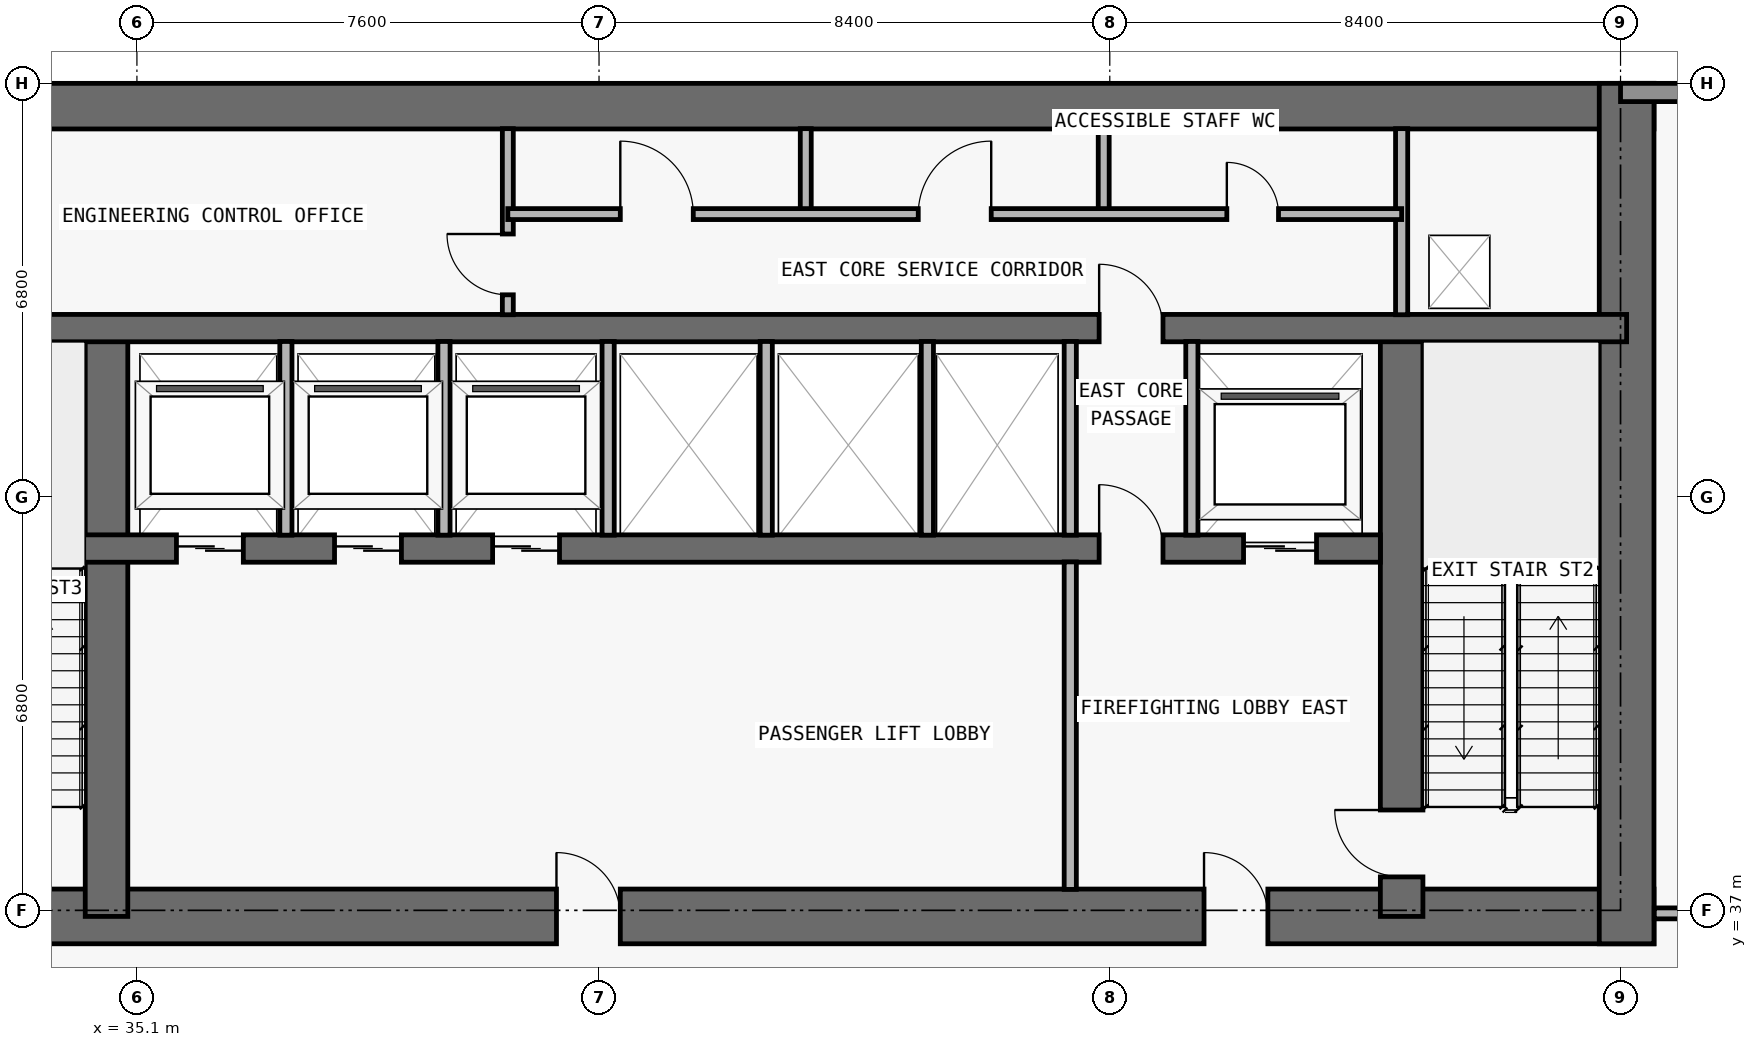
"""IFC4 building model, lengths in metres.
Left out: names, types, materials, properties, quantities, classifications, styles, units other than length and angle.
Written with IfcOpenShell. Run it as: python <this file> out.ifc"""

import sys

from ifc_helpers import new_model, si_unit, direction, frame, frame_2d, origin, place, context, subcontext, project, spatial, rectangle, extrude, element, fill, save


model = new_model("IFC4")
c1 = context("Model", 3, precision=1e-05, world=origin(), true_north=direction((0.0, 1.0)))
c2 = subcontext(c1, "Body", "Model", "MODEL_VIEW")
j1 = project(units=[si_unit("LENGTHUNIT", "METRE"), si_unit("PLANEANGLEUNIT", "RADIAN")], contexts=[c1])
p1 = place(None, origin())
s1 = spatial("IfcSite", under=j1, at=p1, CompositionType="ELEMENT")
p2 = place(p1, origin())
s2 = spatial("IfcBuilding", under=s1, at=p2, CompositionType="ELEMENT")
p3 = place(p2, frame((0.0, 0.0, 79.5)))
s3 = spatial("IfcBuildingStorey", under=s2, at=p3, CompositionType="ELEMENT", Elevation=79.5)
p4 = place(p3, frame((17.75, 36.9, 0.0), z_axis=(0.0, 0.0, 1.0), x_axis=(1.0, 0.0, 0.0)))
e1 = element("IfcWall", 1, at=p4, inside=s3, PredefinedType="SHEAR", context=c2, shape_type="SweptSolid", body=[
    extrude(rectangle(XDim=42.3, YDim=0.9, at=frame_2d((21.15, 0.0))), origin(), (0.0, 0.0, 1.0), 4.85),
])
p5 = place(p4, frame((14.55, 0.0, 0.0)))
e2 = element("IfcOpeningElement", 2, at=p5, cuts=e1, PredefinedType="OPENING", context=c2, shape_type="SweptSolid", body=[
    extrude(rectangle(XDim=1.1, YDim=2.15, at=frame_2d((0.55, 1.075))), frame((0.0, 0.46, 0.0), z_axis=(0.0, -1.0, 0.0), x_axis=(1.0, 0.0, 0.0)), (0.0, 0.0, 1.0), 0.92),
])
p6 = place(p4, frame((6.4, 0.0, 0.0)))
e3 = element("IfcOpeningElement", 3, at=p6, cuts=e1, PredefinedType="OPENING", context=c2, shape_type="SweptSolid", body=[
    extrude(rectangle(XDim=1.05, YDim=2.15, at=frame_2d((0.525, 1.075))), frame((0.0, 0.46, 0.0), z_axis=(0.0, -1.0, 0.0), x_axis=(1.0, 0.0, 0.0)), (0.0, 0.0, 1.0), 0.92),
])
p7 = place(p4, frame((34.9, 0.0, 0.0)))
e4 = element("IfcOpeningElement", 4, at=p7, cuts=e1, PredefinedType="OPENING", context=c2, shape_type="SweptSolid", body=[
    extrude(rectangle(XDim=1.05, YDim=2.15, at=frame_2d((0.525, 1.075))), frame((0.0, 0.46, 0.0), z_axis=(0.0, -1.0, 0.0), x_axis=(1.0, 0.0, 0.0)), (0.0, 0.0, 1.0), 0.92),
])
p8 = place(p4, frame((11.012, 0.0, 0.0)))
e5 = element("IfcOpeningElement", 5, at=p8, cuts=e1, PredefinedType="OPENING", context=c2, shape_type="SweptSolid", body=[
    extrude(rectangle(XDim=1.05, YDim=2.15, at=frame_2d((0.525, 1.075))), frame((0.0, 0.46, 0.0), z_axis=(0.0, -1.0, 0.0), x_axis=(1.0, 0.0, 0.0)), (0.0, 0.0, 1.0), 0.92),
])
p9 = place(p4, frame((24.25, 0.0, 0.0)))
e6 = element("IfcOpeningElement", 6, at=p9, cuts=e1, PredefinedType="OPENING", context=c2, shape_type="SweptSolid", body=[
    extrude(rectangle(XDim=1.05, YDim=2.15, at=frame_2d((0.525, 1.075))), frame((0.0, 0.46, 0.0), z_axis=(0.0, -1.0, 0.0), x_axis=(1.0, 0.0, 0.0)), (0.0, 0.0, 1.0), 0.92),
])
p10 = place(p3, frame((17.75, 50.225, 0.0), z_axis=(0.0, 0.0, 1.0), x_axis=(1.0, 0.0, 0.0)))
e7 = element("IfcWall", 7, at=p10, inside=s3, PredefinedType="SHEAR", context=c2, shape_type="SweptSolid", body=[
    extrude(rectangle(XDim=42.3, YDim=0.75, at=frame_2d((21.15, 0.0))), origin(), (0.0, 0.0, 1.0), 4.85),
])
p11 = place(p3, frame((59.6, 36.45, 0.0), z_axis=(0.0, 0.0, 1.0), x_axis=(0.0, 1.0, 0.0)))
e8 = element("IfcWall", 8, at=p11, inside=s3, PredefinedType="SHEAR", context=c2, shape_type="SweptSolid", body=[
    extrude(rectangle(XDim=14.15, YDim=0.9, at=frame_2d((7.075, 0.0))), origin(), (0.0, 0.0, 1.0), 4.85),
])
p12 = place(p3, frame((55.9, 36.9, 0.0), z_axis=(0.0, 0.0, 1.0), x_axis=(0.0, 1.0, 0.0)))
e9 = element("IfcWall", 9, at=p12, inside=s3, PredefinedType="SHEAR", context=c2, shape_type="SweptSolid", body=[
    extrude(rectangle(XDim=9.675, YDim=0.7, at=frame_2d((4.837, 0.0))), origin(), (0.0, 0.0, 1.0), 4.85),
])
p13 = place(p12, frame((0.65, 0.0, 0.0)))
e10 = element("IfcOpeningElement", 10, at=p13, cuts=e9, PredefinedType="OPENING", context=c2, shape_type="SweptSolid", body=[
    extrude(rectangle(XDim=1.1, YDim=2.15, at=frame_2d((0.55, 1.075))), frame((0.0, 0.36, 0.0), z_axis=(0.0, -1.0, 0.0), x_axis=(1.0, 0.0, 0.0)), (0.0, 0.0, 1.0), 0.72),
])
p14 = place(p3, frame((34.6, 36.9, 0.0), z_axis=(0.0, 0.0, 1.0), x_axis=(0.0, 1.0, 0.0)))
e11 = element("IfcWall", 11, at=p14, inside=s3, PredefinedType="SHEAR", context=c2, shape_type="SweptSolid", body=[
    extrude(rectangle(XDim=9.675, YDim=0.7, at=frame_2d((4.837, 0.0))), origin(), (0.0, 0.0, 1.0), 4.85),
])
p15 = place(p3, frame((22.25, 42.95, 0.0), z_axis=(0.0, 0.0, 1.0), x_axis=(1.0, 0.0, 0.0)))
e12 = element("IfcWall", 12, at=p15, inside=s3, PredefinedType="SHEAR", context=c2, shape_type="SweptSolid", body=[
    extrude(rectangle(XDim=33.3, YDim=0.45, at=frame_2d((16.65, 0.0))), origin(), (0.0, 0.0, 1.0), 4.85),
])
p16 = place(p15, frame((1.05, 0.0, 0.0)))
e13 = element("IfcOpeningElement", 13, at=p16, cuts=e12, PredefinedType="OPENING", context=c2, shape_type="SweptSolid", body=[
    extrude(rectangle(XDim=1.2, YDim=2.2, at=frame_2d((0.6, 1.1))), frame((0.0, 0.235, 0.0), z_axis=(0.0, -1.0, 0.0), x_axis=(1.0, 0.0, 0.0)), (0.0, 0.0, 1.0), 0.47),
])
p17 = place(p15, frame((31.05, 0.0, 0.0)))
e14 = element("IfcOpeningElement", 14, at=p17, cuts=e12, PredefinedType="OPENING", context=c2, shape_type="SweptSolid", body=[
    extrude(rectangle(XDim=1.2, YDim=2.2, at=frame_2d((0.6, 1.1))), frame((0.0, 0.235, 0.0), z_axis=(0.0, -1.0, 0.0), x_axis=(1.0, 0.0, 0.0)), (0.0, 0.0, 1.0), 0.47),
])
p18 = place(p15, frame((13.5, 0.0, 0.0)))
e15 = element("IfcOpeningElement", 15, at=p18, cuts=e12, PredefinedType="OPENING", context=c2, shape_type="SweptSolid", body=[
    extrude(rectangle(XDim=1.1, YDim=2.2, at=frame_2d((0.55, 1.1))), frame((0.0, 0.235, 0.0), z_axis=(0.0, -1.0, 0.0), x_axis=(1.0, 0.0, 0.0)), (0.0, 0.0, 1.0), 0.47),
])
p19 = place(p15, frame((16.1, 0.0, 0.0)))
e16 = element("IfcOpeningElement", 16, at=p19, cuts=e12, PredefinedType="OPENING", context=c2, shape_type="SweptSolid", body=[
    extrude(rectangle(XDim=1.1, YDim=2.2, at=frame_2d((0.55, 1.1))), frame((0.0, 0.235, 0.0), z_axis=(0.0, -1.0, 0.0), x_axis=(1.0, 0.0, 0.0)), (0.0, 0.0, 1.0), 0.47),
])
p20 = place(p15, frame((18.7, 0.0, 0.0)))
e17 = element("IfcOpeningElement", 17, at=p20, cuts=e12, PredefinedType="OPENING", context=c2, shape_type="SweptSolid", body=[
    extrude(rectangle(XDim=1.1, YDim=2.2, at=frame_2d((0.55, 1.1))), frame((0.0, 0.235, 0.0), z_axis=(0.0, -1.0, 0.0), x_axis=(1.0, 0.0, 0.0)), (0.0, 0.0, 1.0), 0.47),
])
p21 = place(p15, frame((3.625, 0.0, 0.0)))
e18 = element("IfcOpeningElement", 18, at=p21, cuts=e12, PredefinedType="OPENING", context=c2, shape_type="SweptSolid", body=[
    extrude(rectangle(XDim=1.05, YDim=2.15, at=frame_2d((0.525, 1.075))), frame((0.0, 0.235, 0.0), z_axis=(0.0, -1.0, 0.0), x_axis=(1.0, 0.0, 0.0)), (0.0, 0.0, 1.0), 0.47),
])
p22 = place(p15, frame((28.675, 0.0, 0.0)))
e19 = element("IfcOpeningElement", 19, at=p22, cuts=e12, PredefinedType="OPENING", context=c2, shape_type="SweptSolid", body=[
    extrude(rectangle(XDim=1.05, YDim=2.15, at=frame_2d((0.525, 1.075))), frame((0.0, 0.235, 0.0), z_axis=(0.0, -1.0, 0.0), x_axis=(1.0, 0.0, 0.0)), (0.0, 0.0, 1.0), 0.47),
])
p23 = place(p3, frame((18.2, 46.575, 0.0), z_axis=(0.0, 0.0, 1.0), x_axis=(1.0, 0.0, 0.0)))
e20 = element("IfcWall", 20, at=p23, inside=s3, PredefinedType="SHEAR", context=c2, shape_type="SweptSolid", body=[
    extrude(rectangle(XDim=41.4, YDim=0.45, at=frame_2d((20.7, 0.0))), origin(), (0.0, 0.0, 1.0), 4.85),
])
p24 = place(p23, frame((7.7, 0.0, 0.0)))
e21 = element("IfcOpeningElement", 21, at=p24, cuts=e20, PredefinedType="OPENING", context=c2, shape_type="SweptSolid", body=[
    extrude(rectangle(XDim=1.0, YDim=2.2, at=frame_2d((0.5, 1.1))), frame((0.0, 0.235, 0.0), z_axis=(0.0, -1.0, 0.0), x_axis=(1.0, 0.0, 0.0)), (0.0, 0.0, 1.0), 0.47),
])
p25 = place(p23, frame((32.725, 0.0, 0.0)))
e22 = element("IfcOpeningElement", 22, at=p25, cuts=e20, PredefinedType="OPENING", context=c2, shape_type="SweptSolid", body=[
    extrude(rectangle(XDim=1.05, YDim=2.15, at=frame_2d((0.525, 1.075))), frame((0.0, 0.235, 0.0), z_axis=(0.0, -1.0, 0.0), x_axis=(1.0, 0.0, 0.0)), (0.0, 0.0, 1.0), 0.47),
])
p26 = place(p3, frame((59.5, 50.45, 0.0), z_axis=(0.0, 0.0, 1.0), x_axis=(1.0, 0.0, 0.0)))
e23 = element("IfcWall", 23, at=p26, inside=s3, PredefinedType="STANDARD", context=c2, shape_type="SweptSolid", body=[
    extrude(rectangle(XDim=13.2, YDim=0.3, at=frame_2d((6.6, 0.0))), origin(), (0.0, 0.0, 1.0), 4.85),
])
p27 = place(p26, frame((5.5, 0.0, 0.85)))
e24 = element("IfcOpeningElement", 24, at=p27, cuts=e23, PredefinedType="OPENING", context=c2, shape_type="SweptSolid", body=[
    extrude(rectangle(XDim=2.2, YDim=1.55, at=frame_2d((1.1, 0.775))), frame((0.0, 0.16, 0.0), z_axis=(0.0, -1.0, 0.0), x_axis=(1.0, 0.0, 0.0)), (0.0, 0.0, 1.0), 0.32),
])
for number, where, z_axis, x_axis in (
    (25, (37.55, 43.17, 0.0), (0.0, 0.0, 1.0), (0.0, 1.0, 0.0)),
    (26, (40.15, 43.17, 0.0), (0.0, 0.0, 1.0), (0.0, 1.0, 0.0)),
):
    element("IfcWall", number, at=place(p3, frame(where, z_axis=z_axis, x_axis=x_axis)), inside=s3, PredefinedType="PARTITIONING", context=c2, shape_type="SweptSolid", body=[
        extrude(rectangle(XDim=3.185, YDim=0.2, at=frame_2d((1.593, 0.0))), origin(), (0.0, 0.0, 1.0), 4.85),
    ])
p28 = place(p3, frame((41.2, 46.795, 0.0), z_axis=(0.0, 0.0, 1.0), x_axis=(0.0, 1.0, 0.0)))
e27 = element("IfcWall", 27, at=p28, inside=s3, PredefinedType="PARTITIONING", context=c2, shape_type="SweptSolid", body=[
    extrude(rectangle(XDim=3.06, YDim=0.18, at=frame_2d((1.53, 0.0))), origin(), (0.0, 0.0, 1.0), 4.85),
])
p29 = place(p28, frame((0.327, 0.0, 0.0)))
e28 = element("IfcOpeningElement", 28, at=p29, cuts=e27, PredefinedType="OPENING", context=c2, shape_type="SweptSolid", body=[
    extrude(rectangle(XDim=1.0, YDim=2.2, at=frame_2d((0.5, 1.1))), frame((0.0, 0.1, 0.0), z_axis=(0.0, -1.0, 0.0), x_axis=(1.0, 0.0, 0.0)), (0.0, 0.0, 1.0), 0.2),
])
for number, where, z_axis, x_axis in (
    (29, (42.85, 43.17, 0.0), (0.0, 0.0, 1.0), (0.0, 1.0, 0.0)),
    (30, (45.45, 43.17, 0.0), (0.0, 0.0, 1.0), (0.0, 1.0, 0.0)),
):
    element("IfcWall", number, at=place(p3, frame(where, z_axis=z_axis, x_axis=x_axis)), inside=s3, PredefinedType="PARTITIONING", context=c2, shape_type="SweptSolid", body=[
        extrude(rectangle(XDim=3.185, YDim=0.2, at=frame_2d((1.593, 0.0))), origin(), (0.0, 0.0, 1.0), 4.85),
    ])
p30 = place(p3, frame((46.1, 48.45, 0.0), z_axis=(0.0, 0.0, 1.0), x_axis=(0.0, 1.0, 0.0)))
e31 = element("IfcWall", 31, at=p30, inside=s3, PredefinedType="PARTITIONING", context=c2, shape_type="SweptSolid", body=[
    extrude(rectangle(XDim=1.405, YDim=0.18, at=frame_2d((0.703, 0.0))), origin(), (0.0, 0.0, 1.0), 4.85),
])
p31 = place(p3, frame((48.1, 43.17, 0.0), z_axis=(0.0, 0.0, 1.0), x_axis=(0.0, 1.0, 0.0)))
e32 = element("IfcWall", 32, at=p31, inside=s3, PredefinedType="PARTITIONING", context=c2, shape_type="SweptSolid", body=[
    extrude(rectangle(XDim=3.185, YDim=0.2, at=frame_2d((1.593, 0.0))), origin(), (0.0, 0.0, 1.0), 4.85),
])
p32 = place(p3, frame((50.45, 37.345, 0.0), z_axis=(0.0, 0.0, 1.0), x_axis=(0.0, 1.0, 0.0)))
e33 = element("IfcWall", 33, at=p32, inside=s3, PredefinedType="PARTITIONING", context=c2, shape_type="SweptSolid", body=[
    extrude(rectangle(XDim=5.385, YDim=0.2, at=frame_2d((2.692, 0.0))), origin(), (0.0, 0.0, 1.0), 4.85),
])
p33 = place(p3, frame((50.45, 43.17, 0.0), z_axis=(0.0, 0.0, 1.0), x_axis=(0.0, 1.0, 0.0)))
e34 = element("IfcWall", 34, at=p33, inside=s3, PredefinedType="PARTITIONING", context=c2, shape_type="SweptSolid", body=[
    extrude(rectangle(XDim=3.185, YDim=0.2, at=frame_2d((1.593, 0.0))), origin(), (0.0, 0.0, 1.0), 4.85),
])
p34 = place(p3, frame((51.0, 48.45, 0.0), z_axis=(0.0, 0.0, 1.0), x_axis=(0.0, 1.0, 0.0)))
e35 = element("IfcWall", 35, at=p34, inside=s3, PredefinedType="PARTITIONING", context=c2, shape_type="SweptSolid", body=[
    extrude(rectangle(XDim=1.405, YDim=0.18, at=frame_2d((0.703, 0.0))), origin(), (0.0, 0.0, 1.0), 4.85),
])
p35 = place(p3, frame((52.45, 43.17, 0.0), z_axis=(0.0, 0.0, 1.0), x_axis=(0.0, 1.0, 0.0)))
e36 = element("IfcWall", 36, at=p35, inside=s3, PredefinedType="PARTITIONING", context=c2, shape_type="SweptSolid", body=[
    extrude(rectangle(XDim=3.185, YDim=0.2, at=frame_2d((1.593, 0.0))), origin(), (0.0, 0.0, 1.0), 4.85),
])
p36 = place(p3, frame((55.9, 46.795, 0.0), z_axis=(0.0, 0.0, 1.0), x_axis=(0.0, 1.0, 0.0)))
e37 = element("IfcWall", 37, at=p36, inside=s3, PredefinedType="PARTITIONING", context=c2, shape_type="SweptSolid", body=[
    extrude(rectangle(XDim=3.06, YDim=0.2, at=frame_2d((1.53, 0.0))), origin(), (0.0, 0.0, 1.0), 4.85),
])
p37 = place(p3, frame((60.055, 36.95, 0.0), z_axis=(0.0, 0.0, 1.0), x_axis=(1.0, 0.0, 0.0)))
e38 = element("IfcWall", 38, at=p37, inside=s3, PredefinedType="PARTITIONING", context=c2, shape_type="SweptSolid", body=[
    extrude(rectangle(XDim=12.645, YDim=0.18, at=frame_2d((6.323, 0.0))), origin(), (0.0, 0.0, 1.0), 4.85),
])
p38 = place(p37, frame((5.722, 0.0, 0.0)))
e39 = element("IfcOpeningElement", 39, at=p38, cuts=e38, PredefinedType="OPENING", context=c2, shape_type="SweptSolid", body=[
    extrude(rectangle(XDim=1.2, YDim=2.2, at=frame_2d((0.6, 1.1))), frame((0.0, 0.1, 0.0), z_axis=(0.0, -1.0, 0.0), x_axis=(1.0, 0.0, 0.0)), (0.0, 0.0, 1.0), 0.2),
])
p39 = place(p3, frame((41.2, 48.45, 0.0), z_axis=(0.0, 0.0, 1.0), x_axis=(1.0, 0.0, 0.0)))
e40 = element("IfcWall", 40, at=p39, inside=s3, PredefinedType="PARTITIONING", context=c2, shape_type="SweptSolid", body=[
    extrude(rectangle(XDim=14.7, YDim=0.18, at=frame_2d((7.35, 0.0))), origin(), (0.0, 0.0, 1.0), 4.85),
])
p40 = place(p39, frame((1.85, 0.0, 0.0)))
e41 = element("IfcOpeningElement", 41, at=p40, cuts=e40, PredefinedType="OPENING", context=c2, shape_type="SweptSolid", body=[
    extrude(rectangle(XDim=1.2, YDim=2.2, at=frame_2d((0.6, 1.1))), frame((0.0, 0.1, 0.0), z_axis=(0.0, -1.0, 0.0), x_axis=(1.0, 0.0, 0.0)), (0.0, 0.0, 1.0), 0.2),
])
p41 = place(p39, frame((6.75, 0.0, 0.0)))
e42 = element("IfcOpeningElement", 42, at=p41, cuts=e40, PredefinedType="OPENING", context=c2, shape_type="SweptSolid", body=[
    extrude(rectangle(XDim=1.2, YDim=2.2, at=frame_2d((0.6, 1.1))), frame((0.0, 0.1, 0.0), z_axis=(0.0, -1.0, 0.0), x_axis=(1.0, 0.0, 0.0)), (0.0, 0.0, 1.0), 0.2),
])
p42 = place(p39, frame((11.825, 0.0, 0.0)))
e43 = element("IfcOpeningElement", 43, at=p42, cuts=e40, PredefinedType="OPENING", context=c2, shape_type="SweptSolid", body=[
    extrude(rectangle(XDim=0.85, YDim=2.1, at=frame_2d((0.425, 1.05))), frame((0.0, 0.1, 0.0), z_axis=(0.0, -1.0, 0.0), x_axis=(1.0, 0.0, 0.0)), (0.0, 0.0, 1.0), 0.2),
])
p43 = place(p17, origin())
e44 = element("IfcDoor", 44, at=p43, inside=s3, OperationType="DOUBLE_DOOR_SLIDING", PredefinedType="DOOR", context=c2, shape_type="SweptSolid", body=[
    extrude(rectangle(XDim=1.2, YDim=2.2, at=frame_2d((0.6, 1.1))), frame((0.0, 0.025, 0.0), z_axis=(0.0, -1.0, 0.0), x_axis=(1.0, 0.0, 0.0)), (0.0, 0.0, 1.0), 0.05),
])
fill(e14, e44)
p44 = place(p18, origin())
e45 = element("IfcDoor", 45, at=p44, inside=s3, OperationType="DOUBLE_DOOR_SLIDING", PredefinedType="DOOR", context=c2, shape_type="SweptSolid", body=[
    extrude(rectangle(XDim=1.1, YDim=2.2, at=frame_2d((0.55, 1.1))), frame((0.0, 0.025, 0.0), z_axis=(0.0, -1.0, 0.0), x_axis=(1.0, 0.0, 0.0)), (0.0, 0.0, 1.0), 0.05),
])
fill(e15, e45)
p45 = place(p19, origin())
e46 = element("IfcDoor", 46, at=p45, inside=s3, OperationType="DOUBLE_DOOR_SLIDING", PredefinedType="DOOR", context=c2, shape_type="SweptSolid", body=[
    extrude(rectangle(XDim=1.1, YDim=2.2, at=frame_2d((0.55, 1.1))), frame((0.0, 0.025, 0.0), z_axis=(0.0, -1.0, 0.0), x_axis=(1.0, 0.0, 0.0)), (0.0, 0.0, 1.0), 0.05),
])
fill(e16, e46)
p46 = place(p20, origin())
e47 = element("IfcDoor", 47, at=p46, inside=s3, OperationType="DOUBLE_DOOR_SLIDING", PredefinedType="DOOR", context=c2, shape_type="SweptSolid", body=[
    extrude(rectangle(XDim=1.1, YDim=2.2, at=frame_2d((0.55, 1.1))), frame((0.0, 0.025, 0.0), z_axis=(0.0, -1.0, 0.0), x_axis=(1.0, 0.0, 0.0)), (0.0, 0.0, 1.0), 0.05),
])
fill(e17, e47)
p47 = place(p7, origin())
e48 = element("IfcDoor", 48, at=p47, inside=s3, OperationType="SINGLE_SWING_LEFT", PredefinedType="DOOR", context=c2, shape_type="SweptSolid", body=[
    extrude(rectangle(XDim=1.05, YDim=2.15, at=frame_2d((0.525, 1.075))), frame((0.0, 0.025, 0.0), z_axis=(0.0, -1.0, 0.0), x_axis=(1.0, 0.0, 0.0)), (0.0, 0.0, 1.0), 0.05),
])
fill(e4, e48)
p48 = place(p13, origin())
e49 = element("IfcDoor", 49, at=p48, inside=s3, OperationType="SINGLE_SWING_RIGHT", PredefinedType="DOOR", context=c2, shape_type="SweptSolid", body=[
    extrude(rectangle(XDim=1.1, YDim=2.15, at=frame_2d((0.55, 1.075))), frame((0.0, 0.025, 0.0), z_axis=(0.0, -1.0, 0.0), x_axis=(1.0, 0.0, 0.0)), (0.0, 0.0, 1.0), 0.05),
])
fill(e10, e49)
p49 = place(p22, origin())
e50 = element("IfcDoor", 50, at=p49, inside=s3, OperationType="SINGLE_SWING_LEFT", PredefinedType="DOOR", context=c2, shape_type="SweptSolid", body=[
    extrude(rectangle(XDim=1.05, YDim=2.15, at=frame_2d((0.525, 1.075))), frame((0.0, 0.025, 0.0), z_axis=(0.0, -1.0, 0.0), x_axis=(1.0, 0.0, 0.0)), (0.0, 0.0, 1.0), 0.05),
])
fill(e19, e50)
p50 = place(p9, origin())
e51 = element("IfcDoor", 51, at=p50, inside=s3, OperationType="SINGLE_SWING_LEFT", PredefinedType="DOOR", context=c2, shape_type="SweptSolid", body=[
    extrude(rectangle(XDim=1.05, YDim=2.15, at=frame_2d((0.525, 1.075))), frame((0.0, 0.025, 0.0), z_axis=(0.0, -1.0, 0.0), x_axis=(1.0, 0.0, 0.0)), (0.0, 0.0, 1.0), 0.05),
])
fill(e6, e51)
p51 = place(p25, origin())
e52 = element("IfcDoor", 52, at=p51, inside=s3, OperationType="SINGLE_SWING_LEFT", PredefinedType="DOOR", context=c2, shape_type="SweptSolid", body=[
    extrude(rectangle(XDim=1.05, YDim=2.15, at=frame_2d((0.525, 1.075))), frame((0.0, 0.025, 0.0), z_axis=(0.0, -1.0, 0.0), x_axis=(1.0, 0.0, 0.0)), (0.0, 0.0, 1.0), 0.05),
])
fill(e22, e52)
p52 = place(p29, origin())
e53 = element("IfcDoor", 53, at=p52, inside=s3, OperationType="SINGLE_SWING_RIGHT", PredefinedType="DOOR", context=c2, shape_type="SweptSolid", body=[
    extrude(rectangle(XDim=1.0, YDim=2.2, at=frame_2d((0.5, 1.1))), frame((0.0, 0.025, 0.0), z_axis=(0.0, -1.0, 0.0), x_axis=(1.0, 0.0, 0.0)), (0.0, 0.0, 1.0), 0.05),
])
fill(e28, e53)
p53 = place(p40, origin())
e54 = element("IfcDoor", 54, at=p53, inside=s3, OperationType="SINGLE_SWING_LEFT", PredefinedType="DOOR", context=c2, shape_type="SweptSolid", body=[
    extrude(rectangle(XDim=1.2, YDim=2.2, at=frame_2d((0.6, 1.1))), frame((0.0, 0.025, 0.0), z_axis=(0.0, -1.0, 0.0), x_axis=(1.0, 0.0, 0.0)), (0.0, 0.0, 1.0), 0.05),
])
fill(e41, e54)
p54 = place(p41, origin())
e55 = element("IfcDoor", 55, at=p54, inside=s3, OperationType="SINGLE_SWING_RIGHT", PredefinedType="DOOR", context=c2, shape_type="SweptSolid", body=[
    extrude(rectangle(XDim=1.2, YDim=2.2, at=frame_2d((0.6, 1.1))), frame((0.0, 0.025, 0.0), z_axis=(0.0, -1.0, 0.0), x_axis=(1.0, 0.0, 0.0)), (0.0, 0.0, 1.0), 0.05),
])
fill(e42, e55)
p55 = place(p42, origin())
e56 = element("IfcDoor", 56, at=p55, inside=s3, OperationType="SINGLE_SWING_LEFT", PredefinedType="DOOR", context=c2, shape_type="SweptSolid", body=[
    extrude(rectangle(XDim=0.85, YDim=2.1, at=frame_2d((0.425, 1.05))), frame((0.0, 0.025, 0.0), z_axis=(0.0, -1.0, 0.0), x_axis=(1.0, 0.0, 0.0)), (0.0, 0.0, 1.0), 0.05),
])
fill(e43, e56)
save(model, sys.argv[1])
